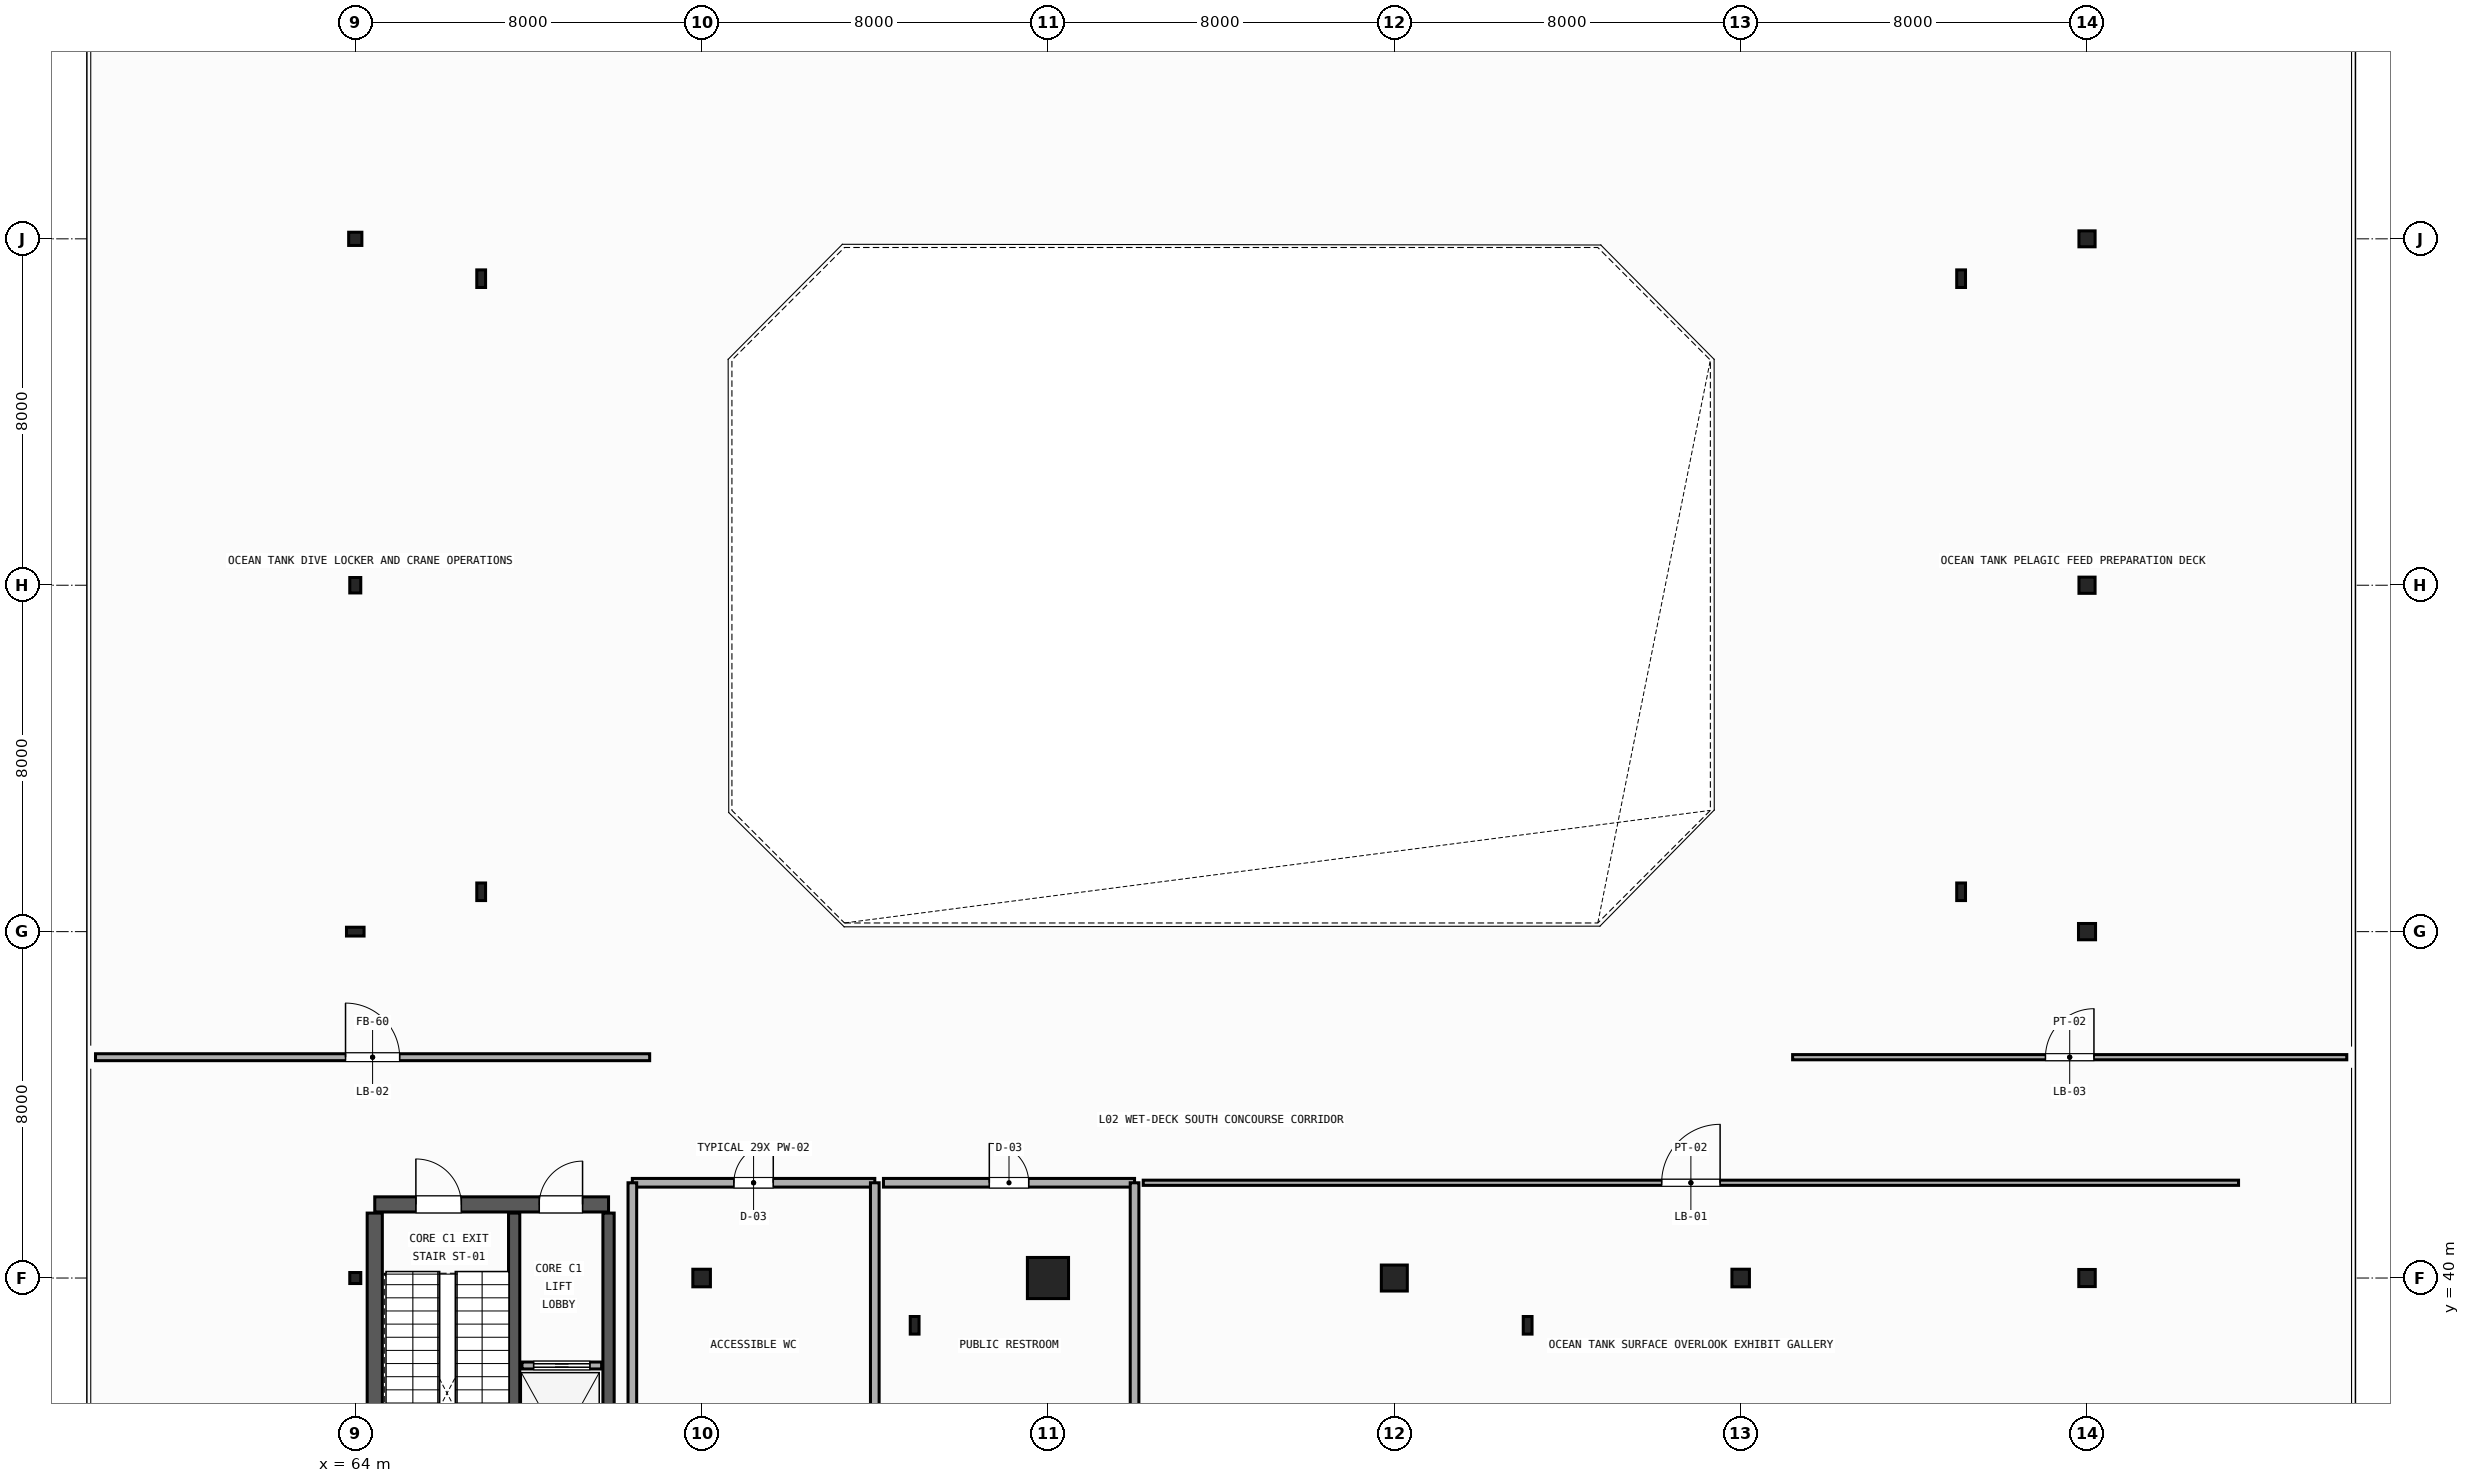
"""IFC4 building model, lengths in metres.
Left out: names, types, materials, properties, quantities, classifications, styles, units other than length and angle.
Written with IfcOpenShell. Run it as: python <this file> out.ifc"""

import sys

from ifc_helpers import new_model, si_unit, direction, frame, frame_2d, origin, origin_2d, place, context, subcontext, project, spatial, rectangle, hollow_rectangle, hollow_circle, i_section, extrude, element, fill, save


model = new_model("IFC4")
c1 = context("Model", 3, precision=1e-05, world=origin(), true_north=direction((0.0, 1.0)))
c2 = subcontext(c1, "Body", "Model", "MODEL_VIEW")
j1 = project(units=[si_unit("LENGTHUNIT", "METRE"), si_unit("PLANEANGLEUNIT", "RADIAN")], contexts=[c1])
p1 = place(None, origin())
s1 = spatial("IfcSite", under=j1, at=p1, CompositionType="ELEMENT")
p2 = place(p1, origin())
s2 = spatial("IfcBuilding", under=s1, at=p2, CompositionType="ELEMENT")
p3 = place(p2, frame((0.0, 0.0, 10.2)))
s3 = spatial("IfcBuildingStorey", under=s2, at=p3, CompositionType="ELEMENT", Elevation=10.2)
p4 = place(p3, frame((64.0, 40.0, 0.0), z_axis=(0.0, 0.0, 1.0), x_axis=(1.0, 0.0, 0.0)))
e1 = element("IfcColumn", 1, at=p4, inside=s3, PredefinedType="COLUMN", context=c2, shape_type="SweptSolid", body=[
    extrude(i_section(OverallWidth=0.254, OverallDepth=0.254, WebThickness=0.009, FlangeThickness=0.014, FilletRadius=0.011, at=origin_2d()), origin(), (0.0, 0.0, 1.0), 4.54),
])
p5 = place(p3, frame((64.0, 48.0, 0.0), z_axis=(0.0, 0.0, 1.0), x_axis=(0.0, 1.0, 0.0)))
e2 = element("IfcColumn", 2, at=p5, inside=s3, PredefinedType="COLUMN", context=c2, shape_type="SweptSolid", body=[
    extrude(hollow_rectangle(XDim=0.203, YDim=0.406, WallThickness=0.012, InnerFilletRadius=0.012, OuterFilletRadius=0.024, at=origin_2d()), origin(), (0.0, 0.0, 1.0), 4.54),
])
p6 = place(p3, frame((64.0, 56.0, 0.0), z_axis=(0.0, 0.0, 1.0), x_axis=(1.0, 0.0, 0.0)))
e3 = element("IfcColumn", 3, at=p6, inside=s3, PredefinedType="COLUMN", context=c2, shape_type="SweptSolid", body=[
    extrude(hollow_rectangle(XDim=0.254, YDim=0.356, WallThickness=0.012, InnerFilletRadius=0.012, OuterFilletRadius=0.024, at=origin_2d()), origin(), (0.0, 0.0, 1.0), 4.54),
])
p7 = place(p3, frame((64.0, 64.0, 0.0), z_axis=(0.0, 0.0, 1.0), x_axis=(0.0, 1.0, 0.0)))
e4 = element("IfcColumn", 4, at=p7, inside=s3, PredefinedType="COLUMN", context=c2, shape_type="SweptSolid", body=[
    extrude(hollow_rectangle(XDim=0.305, YDim=0.305, WallThickness=0.012, InnerFilletRadius=0.012, OuterFilletRadius=0.024, at=origin_2d()), origin(), (0.0, 0.0, 1.0), 4.54),
])
p8 = place(p3, frame((72.0, 40.0, 0.0), z_axis=(0.0, 0.0, 1.0), x_axis=(0.0, 1.0, 0.0)))
e5 = element("IfcColumn", 5, at=p8, inside=s3, PredefinedType="COLUMN", context=c2, shape_type="SweptSolid", body=[
    extrude(hollow_circle(Radius=0.203, WallThickness=0.012, at=origin_2d()), origin(), (0.0, 0.0, 1.0), 4.54),
])
p9 = place(p3, frame((80.0, 40.0, 0.0), z_axis=(0.0, 0.0, 1.0), x_axis=(1.0, 0.0, 0.0)))
e6 = element("IfcColumn", 6, at=p9, inside=s3, PredefinedType="COLUMN", context=c2, shape_type="SweptSolid", body=[
    extrude(rectangle(XDim=0.95, YDim=0.95, at=origin_2d()), origin(), (0.0, 0.0, 1.0), 4.54),
])
p10 = place(p3, frame((88.0, 40.0, 0.0), z_axis=(0.0, 0.0, 1.0), x_axis=(0.0, 1.0, 0.0)))
e7 = element("IfcColumn", 7, at=p10, inside=s3, PredefinedType="COLUMN", context=c2, shape_type="SweptSolid", body=[
    extrude(rectangle(XDim=0.6, YDim=0.6, at=origin_2d()), origin(), (0.0, 0.0, 1.0), 4.54),
])
p11 = place(p3, frame((96.0, 40.0, 0.0), z_axis=(0.0, 0.0, 1.0), x_axis=(1.0, 0.0, 0.0)))
e8 = element("IfcColumn", 8, at=p11, inside=s3, PredefinedType="COLUMN", context=c2, shape_type="SweptSolid", body=[
    extrude(i_section(OverallWidth=0.404, OverallDepth=0.407, WebThickness=0.027, FlangeThickness=0.044, FilletRadius=0.015, at=origin_2d()), origin(), (0.0, 0.0, 1.0), 4.54),
])
p12 = place(p3, frame((104.0, 40.0, 0.0), z_axis=(0.0, 0.0, 1.0), x_axis=(0.0, 1.0, 0.0)))
e9 = element("IfcColumn", 9, at=p12, inside=s3, PredefinedType="COLUMN", context=c2, shape_type="SweptSolid", body=[
    extrude(i_section(OverallWidth=0.395, OverallDepth=0.38, WebThickness=0.019, FlangeThickness=0.03, FilletRadius=0.015, at=origin_2d()), origin(), (0.0, 0.0, 1.0), 4.54),
])
p13 = place(p3, frame((104.0, 48.0, 0.0), z_axis=(0.0, 0.0, 1.0), x_axis=(1.0, 0.0, 0.0)))
e10 = element("IfcColumn", 10, at=p13, inside=s3, PredefinedType="COLUMN", context=c2, shape_type="SweptSolid", body=[
    extrude(i_section(OverallWidth=0.394, OverallDepth=0.376, WebThickness=0.017, FlangeThickness=0.028, FilletRadius=0.015, at=origin_2d()), origin(), (0.0, 0.0, 1.0), 4.54),
])
p14 = place(p3, frame((104.0, 56.0, 0.0), z_axis=(0.0, 0.0, 1.0), x_axis=(0.0, 1.0, 0.0)))
e11 = element("IfcColumn", 11, at=p14, inside=s3, PredefinedType="COLUMN", context=c2, shape_type="SweptSolid", body=[
    extrude(i_section(OverallWidth=0.374, OverallDepth=0.372, WebThickness=0.016, FlangeThickness=0.026, FilletRadius=0.015, at=origin_2d()), origin(), (0.0, 0.0, 1.0), 4.54),
])
p15 = place(p3, frame((104.0, 64.0, 0.0), z_axis=(0.0, 0.0, 1.0), x_axis=(1.0, 0.0, 0.0)))
e12 = element("IfcColumn", 12, at=p15, inside=s3, PredefinedType="COLUMN", context=c2, shape_type="SweptSolid", body=[
    extrude(i_section(OverallWidth=0.373, OverallDepth=0.368, WebThickness=0.015, FlangeThickness=0.024, FilletRadius=0.015, at=origin_2d()), origin(), (0.0, 0.0, 1.0), 4.54),
])
for number, where, z_axis, x_axis in (
    (13, (101.092, 63.08, 0.0), (0.0, 0.0, 1.0), (1.0, 0.0, 0.0)),
    (14, (66.908, 63.08, 0.0), (0.0, 0.0, 1.0), (1.0, 0.0, 0.0)),
    (15, (66.908, 48.92, 0.0), (0.0, 0.0, 1.0), (1.0, 0.0, 0.0)),
    (16, (76.92, 38.908, 0.0), (0.0, 0.0, 1.0), (1.0, 0.0, 0.0)),
    (17, (91.08, 38.908, 0.0), (0.0, 0.0, 1.0), (1.0, 0.0, 0.0)),
    (18, (101.092, 48.92, 0.0), (0.0, 0.0, 1.0), (1.0, 0.0, 0.0)),
):
    element("IfcColumn", number, at=place(p3, frame(where, z_axis=z_axis, x_axis=x_axis)), inside=s3, PredefinedType="COLUMN", context=c2, shape_type="SweptSolid", body=[
        extrude(hollow_rectangle(XDim=0.203, YDim=0.406, WallThickness=0.012, InnerFilletRadius=0.012, OuterFilletRadius=0.024, at=origin_2d()), origin(), (0.0, 0.0, 1.0), 4.52),
    ])
p16 = place(p3, frame((64.45, 41.7, 0.0), z_axis=(0.0, 0.0, 1.0), x_axis=(1.0, 0.0, 0.0)))
e19 = element("IfcWall", 19, at=p16, inside=s3, PredefinedType="SHEAR", context=c2, shape_type="SweptSolid", body=[
    extrude(rectangle(XDim=5.4, YDim=0.35, at=frame_2d((2.7, 0.0))), origin(), (0.0, 0.0, 1.0), 4.53),
])
p17 = place(p16, frame((0.95, 0.0, 0.0)))
e20 = element("IfcOpeningElement", 20, at=p17, cuts=e19, PredefinedType="OPENING", context=c2, shape_type="SweptSolid", body=[
    extrude(rectangle(XDim=1.05, YDim=2.1, at=frame_2d((0.525, 1.05))), frame((0.0, 0.185, 0.0), z_axis=(0.0, -1.0, 0.0), x_axis=(1.0, 0.0, 0.0)), (0.0, 0.0, 1.0), 0.37),
])
p18 = place(p16, frame((3.8, 0.0, 0.0)))
e21 = element("IfcOpeningElement", 21, at=p18, cuts=e19, PredefinedType="OPENING", context=c2, shape_type="SweptSolid", body=[
    extrude(rectangle(XDim=1.0, YDim=2.15, at=frame_2d((0.5, 1.075))), frame((0.0, 0.185, 0.0), z_axis=(0.0, -1.0, 0.0), x_axis=(1.0, 0.0, 0.0)), (0.0, 0.0, 1.0), 0.37),
])
p19 = place(p3, frame((64.45, 34.55, 0.0), z_axis=(0.0, 0.0, 1.0), x_axis=(0.0, 1.0, 0.0)))
e22 = element("IfcWall", 22, at=p19, inside=s3, PredefinedType="SHEAR", context=c2, shape_type="SweptSolid", body=[
    extrude(rectangle(XDim=6.95, YDim=0.35, at=frame_2d((3.475, 0.0))), origin(), (0.0, 0.0, 1.0), 4.53),
])
for number, where, z_axis, x_axis in (
    (23, (69.85, 34.55, 0.0), (0.0, 0.0, 1.0), (0.0, 1.0, 0.0)),
    (24, (67.67, 34.55, 0.0), (0.0, 0.0, 1.0), (0.0, 1.0, 0.0)),
):
    element("IfcWall", number, at=place(p3, frame(where, z_axis=z_axis, x_axis=x_axis)), inside=s3, PredefinedType="SHEAR", context=c2, shape_type="SweptSolid", body=[
        extrude(rectangle(XDim=6.95, YDim=0.26, at=frame_2d((3.475, 0.0))), origin(), (0.0, 0.0, 1.0), 4.53),
    ])
p20 = place(p3, frame((67.85, 37.98, 0.0), z_axis=(0.0, 0.0, 1.0), x_axis=(1.0, 0.0, 0.0)))
e25 = element("IfcWall", 25, at=p20, inside=s3, PredefinedType="PARTITIONING", context=c2, shape_type="SweptSolid", body=[
    extrude(rectangle(XDim=1.84, YDim=0.16, at=frame_2d((0.92, 0.0))), origin(), (0.0, 0.0, 1.0), 3.6),
])
p21 = place(p20, frame((0.27, 0.0, 0.0)))
e26 = element("IfcOpeningElement", 26, at=p21, cuts=e25, PredefinedType="OPENING", context=c2, shape_type="SweptSolid", body=[
    extrude(rectangle(XDim=1.3, YDim=2.2, at=frame_2d((0.65, 1.1))), frame((0.0, 0.09, 0.0), z_axis=(0.0, -1.0, 0.0), x_axis=(1.0, 0.0, 0.0)), (0.0, 0.0, 1.0), 0.18),
])
p22 = place(p3, frame((70.4, 42.2, 0.0), z_axis=(0.0, 0.0, 1.0), x_axis=(1.0, 0.0, 0.0)))
e27 = element("IfcWall", 27, at=p22, inside=s3, PredefinedType="PLUMBINGWALL", context=c2, shape_type="SweptSolid", body=[
    extrude(rectangle(XDim=5.6, YDim=0.2, at=frame_2d((2.8, 0.0))), origin(), (0.0, 0.0, 1.0), 4.29),
])
p23 = place(p22, frame((2.345, 0.0, 0.0)))
e28 = element("IfcOpeningElement", 28, at=p23, cuts=e27, PredefinedType="OPENING", context=c2, shape_type="SweptSolid", body=[
    extrude(rectangle(XDim=0.91, YDim=2.1, at=frame_2d((0.455, 1.05))), frame((0.0, 0.11, 0.0), z_axis=(0.0, -1.0, 0.0), x_axis=(1.0, 0.0, 0.0)), (0.0, 0.0, 1.0), 0.22),
])
p24 = place(p3, frame((70.4, 33.8, 0.0), z_axis=(0.0, 0.0, 1.0), x_axis=(0.0, 1.0, 0.0)))
e29 = element("IfcWall", 29, at=p24, inside=s3, PredefinedType="PLUMBINGWALL", context=c2, shape_type="SweptSolid", body=[
    extrude(rectangle(XDim=8.4, YDim=0.2, at=frame_2d((4.2, 0.0))), origin(), (0.0, 0.0, 1.0), 3.898),
])
p25 = place(p3, frame((76.0, 33.8, 0.0), z_axis=(0.0, 0.0, 1.0), x_axis=(0.0, 1.0, 0.0)))
e30 = element("IfcWall", 30, at=p25, inside=s3, PredefinedType="PLUMBINGWALL", context=c2, shape_type="SweptSolid", body=[
    extrude(rectangle(XDim=8.4, YDim=0.2, at=frame_2d((4.2, 0.0))), origin(), (0.0, 0.0, 1.0), 3.967),
])
p26 = place(p3, frame((76.2, 42.2, 0.0), z_axis=(0.0, 0.0, 1.0), x_axis=(1.0, 0.0, 0.0)))
e31 = element("IfcWall", 31, at=p26, inside=s3, PredefinedType="PLUMBINGWALL", context=c2, shape_type="SweptSolid", body=[
    extrude(rectangle(XDim=5.8, YDim=0.2, at=frame_2d((2.9, 0.0))), origin(), (0.0, 0.0, 1.0), 4.29),
])
p27 = place(p26, frame((2.445, 0.0, 0.0)))
e32 = element("IfcOpeningElement", 32, at=p27, cuts=e31, PredefinedType="OPENING", context=c2, shape_type="SweptSolid", body=[
    extrude(rectangle(XDim=0.91, YDim=2.1, at=frame_2d((0.455, 1.05))), frame((0.0, 0.11, 0.0), z_axis=(0.0, -1.0, 0.0), x_axis=(1.0, 0.0, 0.0)), (0.0, 0.0, 1.0), 0.22),
])
p28 = place(p3, frame((82.0, 33.8, 0.0), z_axis=(0.0, 0.0, 1.0), x_axis=(0.0, 1.0, 0.0)))
e33 = element("IfcWall", 33, at=p28, inside=s3, PredefinedType="PLUMBINGWALL", context=c2, shape_type="SweptSolid", body=[
    extrude(rectangle(XDim=8.4, YDim=0.2, at=frame_2d((4.2, 0.0))), origin(), (0.0, 0.0, 1.0), 3.738),
])
p29 = place(p3, frame((82.2, 42.2, 0.0), z_axis=(0.0, 0.0, 1.0), x_axis=(1.0, 0.0, 0.0)))
e34 = element("IfcWall", 34, at=p29, inside=s3, PredefinedType="PARTITIONING", context=c2, shape_type="SweptSolid", body=[
    extrude(rectangle(XDim=25.3, YDim=0.12, at=frame_2d((12.65, 0.0))), origin(), (0.0, 0.0, 1.0), 3.892),
])
p30 = place(p29, frame((11.975, 0.0, 0.0)))
e35 = element("IfcOpeningElement", 35, at=p30, cuts=e34, PredefinedType="OPENING", context=c2, shape_type="SweptSolid", body=[
    extrude(rectangle(XDim=1.35, YDim=2.25, at=frame_2d((0.675, 1.125))), frame((0.0, 0.07, 0.0), z_axis=(0.0, -1.0, 0.0), x_axis=(1.0, 0.0, 0.0)), (0.0, 0.0, 1.0), 0.14),
])
p31 = place(p3, frame((58.0, 45.1, 0.0), z_axis=(0.0, 0.0, 1.0), x_axis=(1.0, 0.0, 0.0)))
e36 = element("IfcWall", 36, at=p31, inside=s3, PredefinedType="PARTITIONING", context=c2, shape_type="SweptSolid", body=[
    extrude(rectangle(XDim=12.8, YDim=0.16, at=frame_2d((6.4, 0.0))), origin(), (0.0, 0.0, 1.0), 3.738),
])
p32 = place(p31, frame((5.775, 0.0, 0.0)))
e37 = element("IfcOpeningElement", 37, at=p32, cuts=e36, PredefinedType="OPENING", context=c2, shape_type="SweptSolid", body=[
    extrude(rectangle(XDim=1.25, YDim=2.2, at=frame_2d((0.625, 1.1))), frame((0.0, 0.09, 0.0), z_axis=(0.0, -1.0, 0.0), x_axis=(1.0, 0.0, 0.0)), (0.0, 0.0, 1.0), 0.18),
])
p33 = place(p3, frame((97.2, 45.1, 0.0), z_axis=(0.0, 0.0, 1.0), x_axis=(1.0, 0.0, 0.0)))
e38 = element("IfcWall", 38, at=p33, inside=s3, PredefinedType="PARTITIONING", context=c2, shape_type="SweptSolid", body=[
    extrude(rectangle(XDim=12.8, YDim=0.12, at=frame_2d((6.4, 0.0))), origin(), (0.0, 0.0, 1.0), 3.892),
])
p34 = place(p33, frame((5.84, 0.0, 0.0)))
e39 = element("IfcOpeningElement", 39, at=p34, cuts=e38, PredefinedType="OPENING", context=c2, shape_type="SweptSolid", body=[
    extrude(rectangle(XDim=1.12, YDim=2.15, at=frame_2d((0.56, 1.075))), frame((0.0, 0.07, 0.0), z_axis=(0.0, -1.0, 0.0), x_axis=(1.0, 0.0, 0.0)), (0.0, 0.0, 1.0), 0.14),
])
p35 = place(p21, origin())
e40 = element("IfcDoor", 40, at=p35, inside=s3, OperationType="SLIDING_TO_LEFT", PredefinedType="DOOR", context=c2, shape_type="SweptSolid", body=[
    extrude(rectangle(XDim=1.3, YDim=2.2, at=frame_2d((0.65, 1.1))), frame((0.0, 0.025, 0.0), z_axis=(0.0, -1.0, 0.0), x_axis=(1.0, 0.0, 0.0)), (0.0, 0.0, 1.0), 0.05),
])
fill(e26, e40)
p36 = place(p17, origin())
e41 = element("IfcDoor", 41, at=p36, inside=s3, OperationType="SINGLE_SWING_LEFT", PredefinedType="DOOR", context=c2, shape_type="SweptSolid", body=[
    extrude(rectangle(XDim=1.05, YDim=2.1, at=frame_2d((0.525, 1.05))), frame((0.0, 0.025, 0.0), z_axis=(0.0, -1.0, 0.0), x_axis=(1.0, 0.0, 0.0)), (0.0, 0.0, 1.0), 0.05),
])
fill(e20, e41)
p37 = place(p18, origin())
e42 = element("IfcDoor", 42, at=p37, inside=s3, OperationType="SINGLE_SWING_RIGHT", PredefinedType="DOOR", context=c2, shape_type="SweptSolid", body=[
    extrude(rectangle(XDim=1.0, YDim=2.15, at=frame_2d((0.5, 1.075))), frame((0.0, 0.025, 0.0), z_axis=(0.0, -1.0, 0.0), x_axis=(1.0, 0.0, 0.0)), (0.0, 0.0, 1.0), 0.05),
])
fill(e21, e42)
p38 = place(p23, origin())
e43 = element("IfcDoor", 43, at=p38, inside=s3, OperationType="SINGLE_SWING_RIGHT", PredefinedType="DOOR", context=c2, shape_type="SweptSolid", body=[
    extrude(rectangle(XDim=0.91, YDim=2.1, at=frame_2d((0.455, 1.05))), frame((0.0, 0.025, 0.0), z_axis=(0.0, -1.0, 0.0), x_axis=(1.0, 0.0, 0.0)), (0.0, 0.0, 1.0), 0.05),
])
fill(e28, e43)
p39 = place(p27, origin())
e44 = element("IfcDoor", 44, at=p39, inside=s3, OperationType="SINGLE_SWING_LEFT", PredefinedType="DOOR", context=c2, shape_type="SweptSolid", body=[
    extrude(rectangle(XDim=0.91, YDim=2.1, at=frame_2d((0.455, 1.05))), frame((0.0, 0.025, 0.0), z_axis=(0.0, -1.0, 0.0), x_axis=(1.0, 0.0, 0.0)), (0.0, 0.0, 1.0), 0.05),
])
fill(e32, e44)
p40 = place(p30, origin())
e45 = element("IfcDoor", 45, at=p40, inside=s3, OperationType="SINGLE_SWING_RIGHT", PredefinedType="DOOR", context=c2, shape_type="SweptSolid", body=[
    extrude(rectangle(XDim=1.35, YDim=2.25, at=frame_2d((0.675, 1.125))), frame((0.0, 0.025, 0.0), z_axis=(0.0, -1.0, 0.0), x_axis=(1.0, 0.0, 0.0)), (0.0, 0.0, 1.0), 0.05),
])
fill(e35, e45)
p41 = place(p32, origin())
e46 = element("IfcDoor", 46, at=p41, inside=s3, OperationType="SINGLE_SWING_LEFT", PredefinedType="DOOR", context=c2, shape_type="SweptSolid", body=[
    extrude(rectangle(XDim=1.25, YDim=2.2, at=frame_2d((0.625, 1.1))), frame((0.0, 0.025, 0.0), z_axis=(0.0, -1.0, 0.0), x_axis=(1.0, 0.0, 0.0)), (0.0, 0.0, 1.0), 0.05),
])
fill(e37, e46)
p42 = place(p34, origin())
e47 = element("IfcDoor", 47, at=p42, inside=s3, OperationType="SINGLE_SWING_RIGHT", PredefinedType="DOOR", context=c2, shape_type="SweptSolid", body=[
    extrude(rectangle(XDim=1.12, YDim=2.15, at=frame_2d((0.56, 1.075))), frame((0.0, 0.025, 0.0), z_axis=(0.0, -1.0, 0.0), x_axis=(1.0, 0.0, 0.0)), (0.0, 0.0, 1.0), 0.05),
])
fill(e39, e47)
save(model, sys.argv[1])
